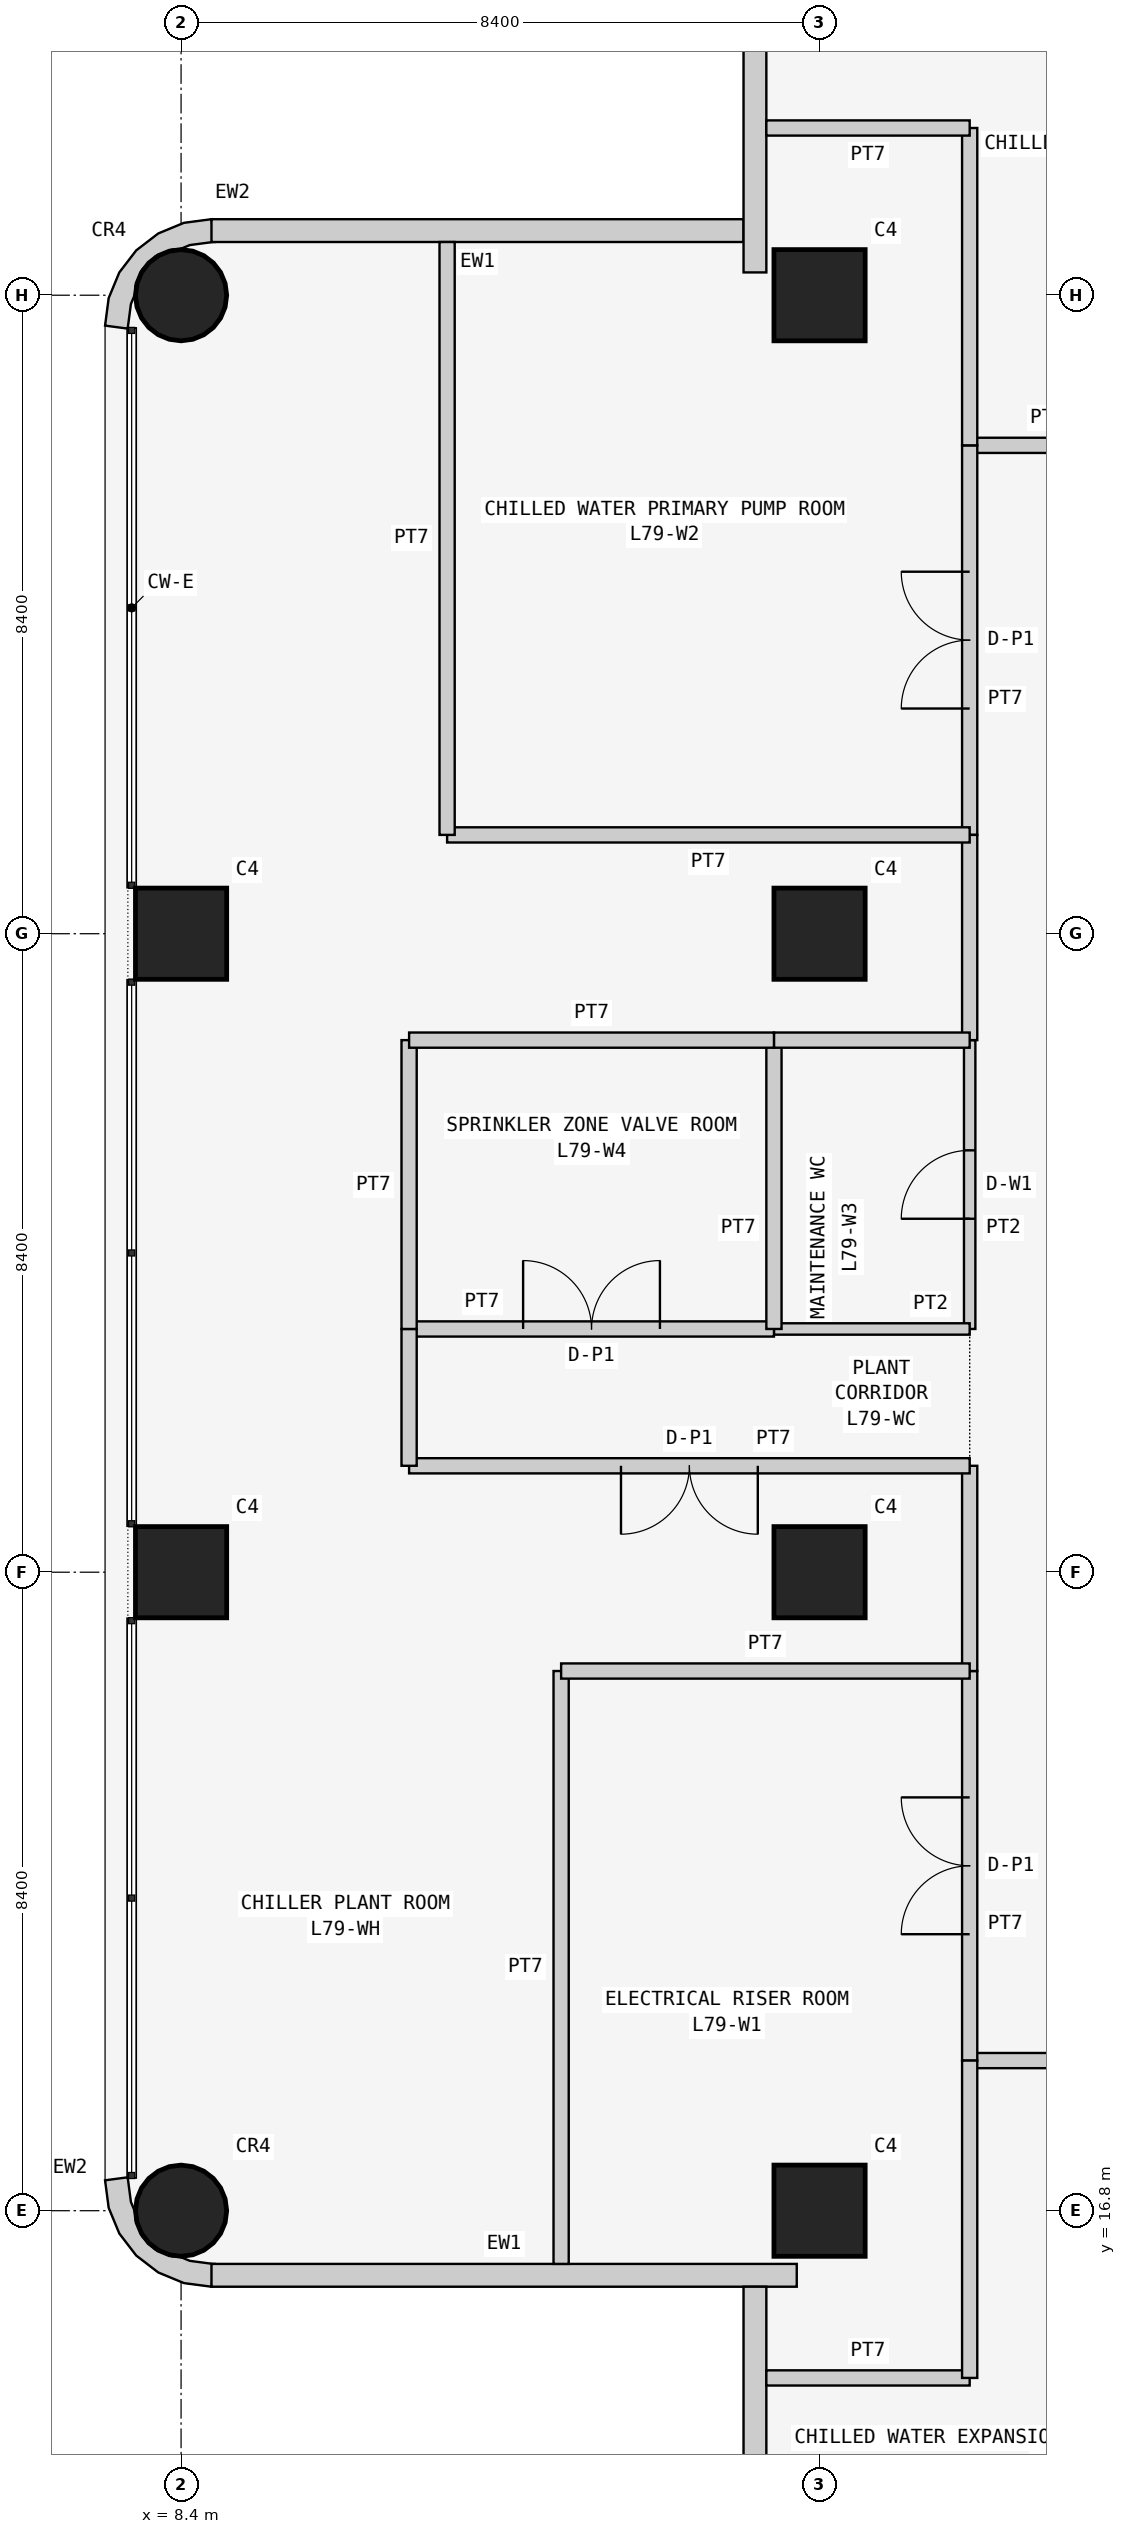
"""IFC4 building model, lengths in metres.
Left out: names, types, materials, properties, quantities, classifications, styles, units other than length and angle.
Written with IfcOpenShell. Run it as: python <this file> out.ifc"""

import sys

from ifc_helpers import new_model, si_unit, direction, frame, frame_2d, origin, origin_2d, place, context, subcontext, project, spatial, polyline, rectangle, circle, outline, extrude, element, fill, save


model = new_model("IFC4")
c1 = context("Model", 3, precision=1e-05, world=origin(), true_north=direction((0.0, 1.0)))
c2 = subcontext(c1, "Body", "Model", "MODEL_VIEW")
j1 = project(units=[si_unit("LENGTHUNIT", "METRE"), si_unit("PLANEANGLEUNIT", "RADIAN")], contexts=[c1])
p1 = place(None, origin())
s1 = spatial("IfcSite", under=j1, at=p1, CompositionType="ELEMENT")
p2 = place(p1, origin())
s2 = spatial("IfcBuilding", under=s1, at=p2, CompositionType="ELEMENT")
p3 = place(p2, frame((0.0, 0.0, 300.9)))
s3 = spatial("IfcBuildingStorey", under=s2, at=p3, CompositionType="ELEMENT", Elevation=300.9)
p4 = place(p3, frame((8.4, 16.8, 0.0), z_axis=(0.0, 0.0, 1.0), x_axis=(1.0, 0.0, 0.0)))
e1 = element("IfcColumn", 1, at=p4, inside=s3, PredefinedType="COLUMN", context=c2, shape_type="SweptSolid", body=[
    extrude(circle(Radius=0.6, at=origin_2d()), origin(), (0.0, 0.0, 1.0), 4.5),
])
for number, where, z_axis, x_axis in (
    (2, (8.4, 25.2, 0.0), (0.0, 0.0, 1.0), (1.0, 0.0, 0.0)),
    (3, (8.4, 33.6, 0.0), (0.0, 0.0, 1.0), (1.0, 0.0, 0.0)),
):
    element("IfcColumn", number, at=place(p3, frame(where, z_axis=z_axis, x_axis=x_axis)), inside=s3, PredefinedType="COLUMN", context=c2, shape_type="SweptSolid", body=[
        extrude(rectangle(XDim=1.2, YDim=1.2, at=origin_2d()), origin(), (0.0, 0.0, 1.0), 4.5),
    ])
p5 = place(p3, frame((8.4, 42.0, 0.0), z_axis=(0.0, 0.0, 1.0), x_axis=(1.0, 0.0, 0.0)))
e4 = element("IfcColumn", 4, at=p5, inside=s3, PredefinedType="COLUMN", context=c2, shape_type="SweptSolid", body=[
    extrude(circle(Radius=0.6, at=origin_2d()), origin(), (0.0, 0.0, 1.0), 4.5),
])
for number, where, z_axis, x_axis in (
    (5, (16.8, 16.8, 0.0), (0.0, 0.0, 1.0), (1.0, 0.0, 0.0)),
    (6, (16.8, 25.2, 0.0), (0.0, 0.0, 1.0), (1.0, 0.0, 0.0)),
    (7, (16.8, 33.6, 0.0), (0.0, 0.0, 1.0), (1.0, 0.0, 0.0)),
    (8, (16.8, 42.0, 0.0), (0.0, 0.0, 1.0), (1.0, 0.0, 0.0)),
):
    element("IfcColumn", number, at=place(p3, frame(where, z_axis=z_axis, x_axis=x_axis)), inside=s3, PredefinedType="COLUMN", context=c2, shape_type="SweptSolid", body=[
        extrude(rectangle(XDim=1.2, YDim=1.2, at=origin_2d()), origin(), (0.0, 0.0, 1.0), 4.5),
    ])
p6 = place(p3, frame((15.8, 42.85, 0.0), z_axis=(0.0, 0.0, 1.0), x_axis=(-1.0, 0.0, 0.0)))
e9 = element("IfcWall", 9, at=p6, inside=s3, PredefinedType="SOLIDWALL", context=c2, shape_type="SweptSolid", body=[
    extrude(rectangle(XDim=7.0, YDim=0.3, at=frame_2d((3.5, 0.0))), origin(), (0.0, 0.0, 1.0), 4.25),
])
p7 = place(p3, frame((8.8, 15.95, 0.0), z_axis=(0.0, 0.0, 1.0), x_axis=(1.0, 0.0, 0.0)))
e10 = element("IfcWall", 10, at=p7, inside=s3, PredefinedType="SOLIDWALL", context=c2, shape_type="SweptSolid", body=[
    extrude(rectangle(XDim=7.7, YDim=0.3, at=frame_2d((3.85, 0.0))), origin(), (0.0, 0.0, 1.0), 4.25),
])
p8 = place(p3, frame((15.95, 15.8, 0.0), z_axis=(0.0, 0.0, 1.0), x_axis=(0.0, -1.0, 0.0)))
e11 = element("IfcWall", 11, at=p8, inside=s3, PredefinedType="SOLIDWALL", context=c2, shape_type="SweptSolid", body=[
    extrude(rectangle(XDim=7.0, YDim=0.3, at=frame_2d((3.5, 0.0))), origin(), (0.0, 0.0, 1.0), 4.25),
])
p9 = place(p3, frame((15.95, 50.0, 0.0), z_axis=(0.0, 0.0, 1.0), x_axis=(0.0, -1.0, 0.0)))
e12 = element("IfcWall", 12, at=p9, inside=s3, PredefinedType="SOLIDWALL", context=c2, shape_type="SweptSolid", body=[
    extrude(rectangle(XDim=7.7, YDim=0.3, at=frame_2d((3.85, 0.0))), origin(), (0.0, 0.0, 1.0), 4.25),
])
p10 = place(p3, frame((8.762, 42.576, 0.0), z_axis=(0.0, 0.0, 1.0), x_axis=(-0.707106781187, 0.707106781187, 0.0)))
e13 = element("IfcWall", 13, at=p10, inside=s3, PredefinedType="SOLIDWALL", context=c2, shape_type="SweptSolid", body=[
    extrude(outline(polyline([(0.233, 0.114), (0.047, -0.129), (0.033, -0.143), (0.273, -0.327), (0.495, -0.037), (0.635, 0.3), (0.683, 0.663), (0.635, 1.025), (0.495, 1.363), (0.273, 1.653), (0.033, 1.469), (0.047, 1.455), (0.233, 1.212), (0.292, 1.069), (0.358, 1.003), (0.449, 0.783), (0.449, 0.543), (0.358, 0.322), (0.292, 0.257), (0.233, 0.114)])), origin(), (0.0, 0.0, 1.0), 4.25),
])
p11 = place(p3, frame((7.824, 17.162, 0.0), z_axis=(0.0, 0.0, 1.0), x_axis=(-0.707106781187, -0.707106781187, 0.0)))
e14 = element("IfcWall", 14, at=p11, inside=s3, PredefinedType="SOLIDWALL", context=c2, shape_type="SweptSolid", body=[
    extrude(outline(polyline([(0.047, 1.454), (0.233, 1.212), (0.292, 1.069), (0.358, 1.003), (0.449, 0.782), (0.449, 0.543), (0.358, 0.323), (0.292, 0.257), (0.233, 0.114), (0.047, -0.129), (0.033, -0.143), (0.273, -0.327), (0.495, -0.037), (0.635, 0.301), (0.683, 0.663), (0.635, 1.025), (0.495, 1.363), (0.273, 1.653), (0.033, 1.469), (0.047, 1.454)])), origin(), (0.0, 0.0, 1.0), 4.25),
])
p12 = place(p3, frame((18.775, 40.025, 0.0), z_axis=(0.0, 0.0, 1.0), x_axis=(1.0, 0.0, 0.0)))
e15 = element("IfcWall", 15, at=p12, inside=s3, PredefinedType="PARTITIONING", context=c2, shape_type="SweptSolid", body=[
    extrude(rectangle(XDim=5.125, YDim=0.2, at=frame_2d((2.562, 0.0))), origin(), (0.0, 0.0, 1.0), 4.25),
])
p13 = place(p12, frame((1.663, 0.0, 0.0)))
e16 = element("IfcOpeningElement", 16, at=p13, cuts=e15, PredefinedType="OPENING", context=c2, shape_type="SweptSolid", body=[
    extrude(rectangle(XDim=1.8, YDim=2.4, at=frame_2d((0.9, 1.2))), frame((0.0, 0.11, 0.0), z_axis=(0.0, -1.0, 0.0), x_axis=(1.0, 0.0, 0.0)), (0.0, 0.0, 1.0), 0.22),
])
p14 = place(p3, frame((23.9, 18.775, 0.0), z_axis=(0.0, 0.0, 1.0), x_axis=(-1.0, 0.0, 0.0)))
e17 = element("IfcWall", 17, at=p14, inside=s3, PredefinedType="PARTITIONING", context=c2, shape_type="SweptSolid", body=[
    extrude(rectangle(XDim=5.125, YDim=0.2, at=frame_2d((2.562, 0.0))), origin(), (0.0, 0.0, 1.0), 4.25),
])
p15 = place(p14, frame((1.663, 0.0, 0.0)))
e18 = element("IfcOpeningElement", 18, at=p15, cuts=e17, PredefinedType="OPENING", context=c2, shape_type="SweptSolid", body=[
    extrude(rectangle(XDim=1.8, YDim=2.4, at=frame_2d((0.9, 1.2))), frame((0.0, 0.11, 0.0), z_axis=(0.0, -1.0, 0.0), x_axis=(1.0, 0.0, 0.0)), (0.0, 0.0, 1.0), 0.22),
])
p16 = place(p3, frame((18.775, 18.775, 0.0), z_axis=(0.0, 0.0, 1.0), x_axis=(0.0, 1.0, 0.0)))
e19 = element("IfcWall", 19, at=p16, inside=s3, PredefinedType="PARTITIONING", context=c2, shape_type="SweptSolid", body=[
    extrude(rectangle(XDim=5.125, YDim=0.2, at=frame_2d((2.562, 0.0))), origin(), (0.0, 0.0, 1.0), 4.25),
])
p17 = place(p16, frame((1.663, 0.0, 0.0)))
e20 = element("IfcOpeningElement", 20, at=p17, cuts=e19, PredefinedType="OPENING", context=c2, shape_type="SweptSolid", body=[
    extrude(rectangle(XDim=1.8, YDim=2.4, at=frame_2d((0.9, 1.2))), frame((0.0, 0.11, 0.0), z_axis=(0.0, -1.0, 0.0), x_axis=(1.0, 0.0, 0.0)), (0.0, 0.0, 1.0), 0.22),
])
p18 = place(p3, frame((18.775, 34.9, 0.0), z_axis=(0.0, 0.0, 1.0), x_axis=(0.0, 1.0, 0.0)))
e21 = element("IfcWall", 21, at=p18, inside=s3, PredefinedType="PARTITIONING", context=c2, shape_type="SweptSolid", body=[
    extrude(rectangle(XDim=5.125, YDim=0.2, at=frame_2d((2.562, 0.0))), origin(), (0.0, 0.0, 1.0), 4.25),
])
p19 = place(p18, frame((1.663, 0.0, 0.0)))
e22 = element("IfcOpeningElement", 22, at=p19, cuts=e21, PredefinedType="OPENING", context=c2, shape_type="SweptSolid", body=[
    extrude(rectangle(XDim=1.8, YDim=2.4, at=frame_2d((0.9, 1.2))), frame((0.0, 0.11, 0.0), z_axis=(0.0, -1.0, 0.0), x_axis=(1.0, 0.0, 0.0)), (0.0, 0.0, 1.0), 0.22),
])
p20 = place(p3, frame((18.775, 28.4, 0.0), z_axis=(0.0, 0.0, 1.0), x_axis=(0.0, 1.0, 0.0)))
e23 = element("IfcWall", 23, at=p20, inside=s3, PredefinedType="PARTITIONING", context=c2, shape_type="SweptSolid", body=[
    extrude(rectangle(XDim=3.8, YDim=0.15, at=frame_2d((1.9, 0.0))), origin(), (0.0, 0.0, 1.0), 4.25),
])
p21 = place(p20, frame((1.45, 0.0, 0.0)))
e24 = element("IfcOpeningElement", 24, at=p21, cuts=e23, PredefinedType="OPENING", context=c2, shape_type="SweptSolid", body=[
    extrude(rectangle(XDim=0.9, YDim=2.1, at=frame_2d((0.45, 1.05))), frame((0.0, 0.085, 0.0), z_axis=(0.0, -1.0, 0.0), x_axis=(1.0, 0.0, 0.0)), (0.0, 0.0, 1.0), 0.17),
])
p22 = place(p3, frame((18.775, 23.9, 0.0), z_axis=(0.0, 0.0, 1.0), x_axis=(0.0, 1.0, 0.0)))
e25 = element("IfcWall", 25, at=p22, inside=s3, PredefinedType="PARTITIONING", context=c2, shape_type="SweptSolid", body=[
    extrude(rectangle(XDim=2.7, YDim=0.2, at=frame_2d((1.35, 0.0))), origin(), (0.0, 0.0, 1.0), 4.25),
])
p23 = place(p3, frame((18.775, 32.2, 0.0), z_axis=(0.0, 0.0, 1.0), x_axis=(0.0, 1.0, 0.0)))
e26 = element("IfcWall", 26, at=p23, inside=s3, PredefinedType="PARTITIONING", context=c2, shape_type="SweptSolid", body=[
    extrude(rectangle(XDim=2.7, YDim=0.2, at=frame_2d((1.35, 0.0))), origin(), (0.0, 0.0, 1.0), 4.25),
])
p24 = place(p3, frame((18.775, 40.025, 0.0), z_axis=(0.0, 0.0, 1.0), x_axis=(0.0, 1.0, 0.0)))
e27 = element("IfcWall", 27, at=p24, inside=s3, PredefinedType="PARTITIONING", context=c2, shape_type="SweptSolid", body=[
    extrude(rectangle(XDim=4.175, YDim=0.2, at=frame_2d((2.087, 0.0))), origin(), (0.0, 0.0, 1.0), 4.25),
])
for number, where, z_axis, x_axis in (
    (28, (18.775, 44.2, 0.0), (0.0, 0.0, 1.0), (-1.0, 0.0, 0.0)),
    (29, (16.1, 14.6, 0.0), (0.0, 0.0, 1.0), (1.0, 0.0, 0.0)),
):
    element("IfcWall", number, at=place(p3, frame(where, z_axis=z_axis, x_axis=x_axis)), inside=s3, PredefinedType="PARTITIONING", context=c2, shape_type="SweptSolid", body=[
        extrude(rectangle(XDim=2.675, YDim=0.2, at=frame_2d((1.337, 0.0))), origin(), (0.0, 0.0, 1.0), 4.25),
    ])
p25 = place(p3, frame((18.775, 14.6, 0.0), z_axis=(0.0, 0.0, 1.0), x_axis=(0.0, 1.0, 0.0)))
e30 = element("IfcWall", 30, at=p25, inside=s3, PredefinedType="PARTITIONING", context=c2, shape_type="SweptSolid", body=[
    extrude(rectangle(XDim=4.175, YDim=0.2, at=frame_2d((2.087, 0.0))), origin(), (0.0, 0.0, 1.0), 4.25),
])
p26 = place(p3, frame((13.4, 16.1, 0.0), z_axis=(0.0, 0.0, 1.0), x_axis=(0.0, 1.0, 0.0)))
e31 = element("IfcWall", 31, at=p26, inside=s3, PredefinedType="PARTITIONING", context=c2, shape_type="SweptSolid", body=[
    extrude(rectangle(XDim=7.8, YDim=0.2, at=frame_2d((3.9, 0.0))), origin(), (0.0, 0.0, 1.0), 4.25),
])
p27 = place(p3, frame((13.4, 23.9, 0.0), z_axis=(0.0, 0.0, 1.0), x_axis=(1.0, 0.0, 0.0)))
e32 = element("IfcWall", 32, at=p27, inside=s3, PredefinedType="PARTITIONING", context=c2, shape_type="SweptSolid", body=[
    extrude(rectangle(XDim=5.375, YDim=0.2, at=frame_2d((2.688, 0.0))), origin(), (0.0, 0.0, 1.0), 4.25),
])
p28 = place(p3, frame((18.775, 34.9, 0.0), z_axis=(0.0, 0.0, 1.0), x_axis=(-1.0, 0.0, 0.0)))
e33 = element("IfcWall", 33, at=p28, inside=s3, PredefinedType="PARTITIONING", context=c2, shape_type="SweptSolid", body=[
    extrude(rectangle(XDim=6.875, YDim=0.2, at=frame_2d((3.438, 0.0))), origin(), (0.0, 0.0, 1.0), 4.25),
])
p29 = place(p3, frame((11.9, 34.9, 0.0), z_axis=(0.0, 0.0, 1.0), x_axis=(0.0, 1.0, 0.0)))
e34 = element("IfcWall", 34, at=p29, inside=s3, PredefinedType="PARTITIONING", context=c2, shape_type="SweptSolid", body=[
    extrude(rectangle(XDim=7.8, YDim=0.2, at=frame_2d((3.9, 0.0))), origin(), (0.0, 0.0, 1.0), 4.25),
])
p30 = place(p3, frame((16.2, 28.4, 0.0), z_axis=(0.0, 0.0, 1.0), x_axis=(1.0, 0.0, 0.0)))
e35 = element("IfcWall", 35, at=p30, inside=s3, PredefinedType="PARTITIONING", context=c2, shape_type="SweptSolid", body=[
    extrude(rectangle(XDim=2.575, YDim=0.15, at=frame_2d((1.288, 0.0))), origin(), (0.0, 0.0, 1.0), 4.25),
])
p31 = place(p3, frame((11.4, 28.4, 0.0), z_axis=(0.0, 0.0, 1.0), x_axis=(1.0, 0.0, 0.0)))
e36 = element("IfcWall", 36, at=p31, inside=s3, PredefinedType="PARTITIONING", context=c2, shape_type="SweptSolid", body=[
    extrude(rectangle(XDim=4.8, YDim=0.2, at=frame_2d((2.4, 0.0))), origin(), (0.0, 0.0, 1.0), 4.25),
])
p32 = place(p31, frame((1.5, 0.0, 0.0)))
e37 = element("IfcOpeningElement", 37, at=p32, cuts=e36, PredefinedType="OPENING", context=c2, shape_type="SweptSolid", body=[
    extrude(rectangle(XDim=1.8, YDim=2.4, at=frame_2d((0.9, 1.2))), frame((0.0, 0.11, 0.0), z_axis=(0.0, -1.0, 0.0), x_axis=(1.0, 0.0, 0.0)), (0.0, 0.0, 1.0), 0.22),
])
p33 = place(p3, frame((18.775, 26.6, 0.0), z_axis=(0.0, 0.0, 1.0), x_axis=(-1.0, 0.0, 0.0)))
e38 = element("IfcWall", 38, at=p33, inside=s3, PredefinedType="PARTITIONING", context=c2, shape_type="SweptSolid", body=[
    extrude(rectangle(XDim=7.375, YDim=0.2, at=frame_2d((3.688, 0.0))), origin(), (0.0, 0.0, 1.0), 4.25),
])
p34 = place(p33, frame((2.788, 0.0, 0.0)))
e39 = element("IfcOpeningElement", 39, at=p34, cuts=e38, PredefinedType="OPENING", context=c2, shape_type="SweptSolid", body=[
    extrude(rectangle(XDim=1.8, YDim=2.4, at=frame_2d((0.9, 1.2))), frame((0.0, 0.11, 0.0), z_axis=(0.0, -1.0, 0.0), x_axis=(1.0, 0.0, 0.0)), (0.0, 0.0, 1.0), 0.22),
])
p35 = place(p3, frame((11.4, 26.6, 0.0), z_axis=(0.0, 0.0, 1.0), x_axis=(0.0, 1.0, 0.0)))
e40 = element("IfcWall", 40, at=p35, inside=s3, PredefinedType="PARTITIONING", context=c2, shape_type="SweptSolid", body=[
    extrude(rectangle(XDim=1.8, YDim=0.2, at=frame_2d((0.9, 0.0))), origin(), (0.0, 0.0, 1.0), 4.25),
])
p36 = place(p3, frame((16.2, 28.4, 0.0), z_axis=(0.0, 0.0, 1.0), x_axis=(0.0, 1.0, 0.0)))
e41 = element("IfcWall", 41, at=p36, inside=s3, PredefinedType="PARTITIONING", context=c2, shape_type="SweptSolid", body=[
    extrude(rectangle(XDim=3.8, YDim=0.2, at=frame_2d((1.9, 0.0))), origin(), (0.0, 0.0, 1.0), 4.25),
])
p37 = place(p3, frame((16.2, 32.2, 0.0), z_axis=(0.0, 0.0, 1.0), x_axis=(1.0, 0.0, 0.0)))
e42 = element("IfcWall", 42, at=p37, inside=s3, PredefinedType="PARTITIONING", context=c2, shape_type="SweptSolid", body=[
    extrude(rectangle(XDim=2.575, YDim=0.2, at=frame_2d((1.288, 0.0))), origin(), (0.0, 0.0, 1.0), 4.25),
])
p38 = place(p3, frame((11.4, 28.4, 0.0), z_axis=(0.0, 0.0, 1.0), x_axis=(0.0, 1.0, 0.0)))
e43 = element("IfcWall", 43, at=p38, inside=s3, PredefinedType="PARTITIONING", context=c2, shape_type="SweptSolid", body=[
    extrude(rectangle(XDim=3.8, YDim=0.2, at=frame_2d((1.9, 0.0))), origin(), (0.0, 0.0, 1.0), 4.25),
])
p39 = place(p3, frame((11.4, 32.2, 0.0), z_axis=(0.0, 0.0, 1.0), x_axis=(1.0, 0.0, 0.0)))
e44 = element("IfcWall", 44, at=p39, inside=s3, PredefinedType="PARTITIONING", context=c2, shape_type="SweptSolid", body=[
    extrude(rectangle(XDim=4.8, YDim=0.2, at=frame_2d((2.4, 0.0))), origin(), (0.0, 0.0, 1.0), 4.25),
])
p40 = place(p17, origin())
e45 = element("IfcDoor", 45, at=p40, inside=s3, OperationType="DOUBLE_DOOR_SINGLE_SWING", PredefinedType="DOOR", context=c2, shape_type="SweptSolid", body=[
    extrude(rectangle(XDim=1.8, YDim=2.4, at=frame_2d((0.9, 1.2))), frame((0.0, 0.025, 0.0), z_axis=(0.0, -1.0, 0.0), x_axis=(1.0, 0.0, 0.0)), (0.0, 0.0, 1.0), 0.05),
])
fill(e20, e45)
p41 = place(p19, origin())
e46 = element("IfcDoor", 46, at=p41, inside=s3, OperationType="DOUBLE_DOOR_SINGLE_SWING", PredefinedType="DOOR", context=c2, shape_type="SweptSolid", body=[
    extrude(rectangle(XDim=1.8, YDim=2.4, at=frame_2d((0.9, 1.2))), frame((0.0, 0.025, 0.0), z_axis=(0.0, -1.0, 0.0), x_axis=(1.0, 0.0, 0.0)), (0.0, 0.0, 1.0), 0.05),
])
fill(e22, e46)
p42 = place(p21, origin())
e47 = element("IfcDoor", 47, at=p42, inside=s3, OperationType="SINGLE_SWING_LEFT", PredefinedType="DOOR", context=c2, shape_type="SweptSolid", body=[
    extrude(rectangle(XDim=0.9, YDim=2.1, at=frame_2d((0.45, 1.05))), frame((0.0, 0.025, 0.0), z_axis=(0.0, -1.0, 0.0), x_axis=(1.0, 0.0, 0.0)), (0.0, 0.0, 1.0), 0.05),
])
fill(e24, e47)
p43 = place(p32, origin())
e48 = element("IfcDoor", 48, at=p43, inside=s3, OperationType="DOUBLE_DOOR_SINGLE_SWING", PredefinedType="DOOR", context=c2, shape_type="SweptSolid", body=[
    extrude(rectangle(XDim=1.8, YDim=2.4, at=frame_2d((0.9, 1.2))), frame((0.0, 0.025, 0.0), z_axis=(0.0, -1.0, 0.0), x_axis=(1.0, 0.0, 0.0)), (0.0, 0.0, 1.0), 0.05),
])
fill(e37, e48)
p44 = place(p34, origin())
e49 = element("IfcDoor", 49, at=p44, inside=s3, OperationType="DOUBLE_DOOR_SINGLE_SWING", PredefinedType="DOOR", context=c2, shape_type="SweptSolid", body=[
    extrude(rectangle(XDim=1.8, YDim=2.4, at=frame_2d((0.9, 1.2))), frame((0.0, 0.025, 0.0), z_axis=(0.0, -1.0, 0.0), x_axis=(1.0, 0.0, 0.0)), (0.0, 0.0, 1.0), 0.05),
])
fill(e39, e49)
save(model, sys.argv[1])
